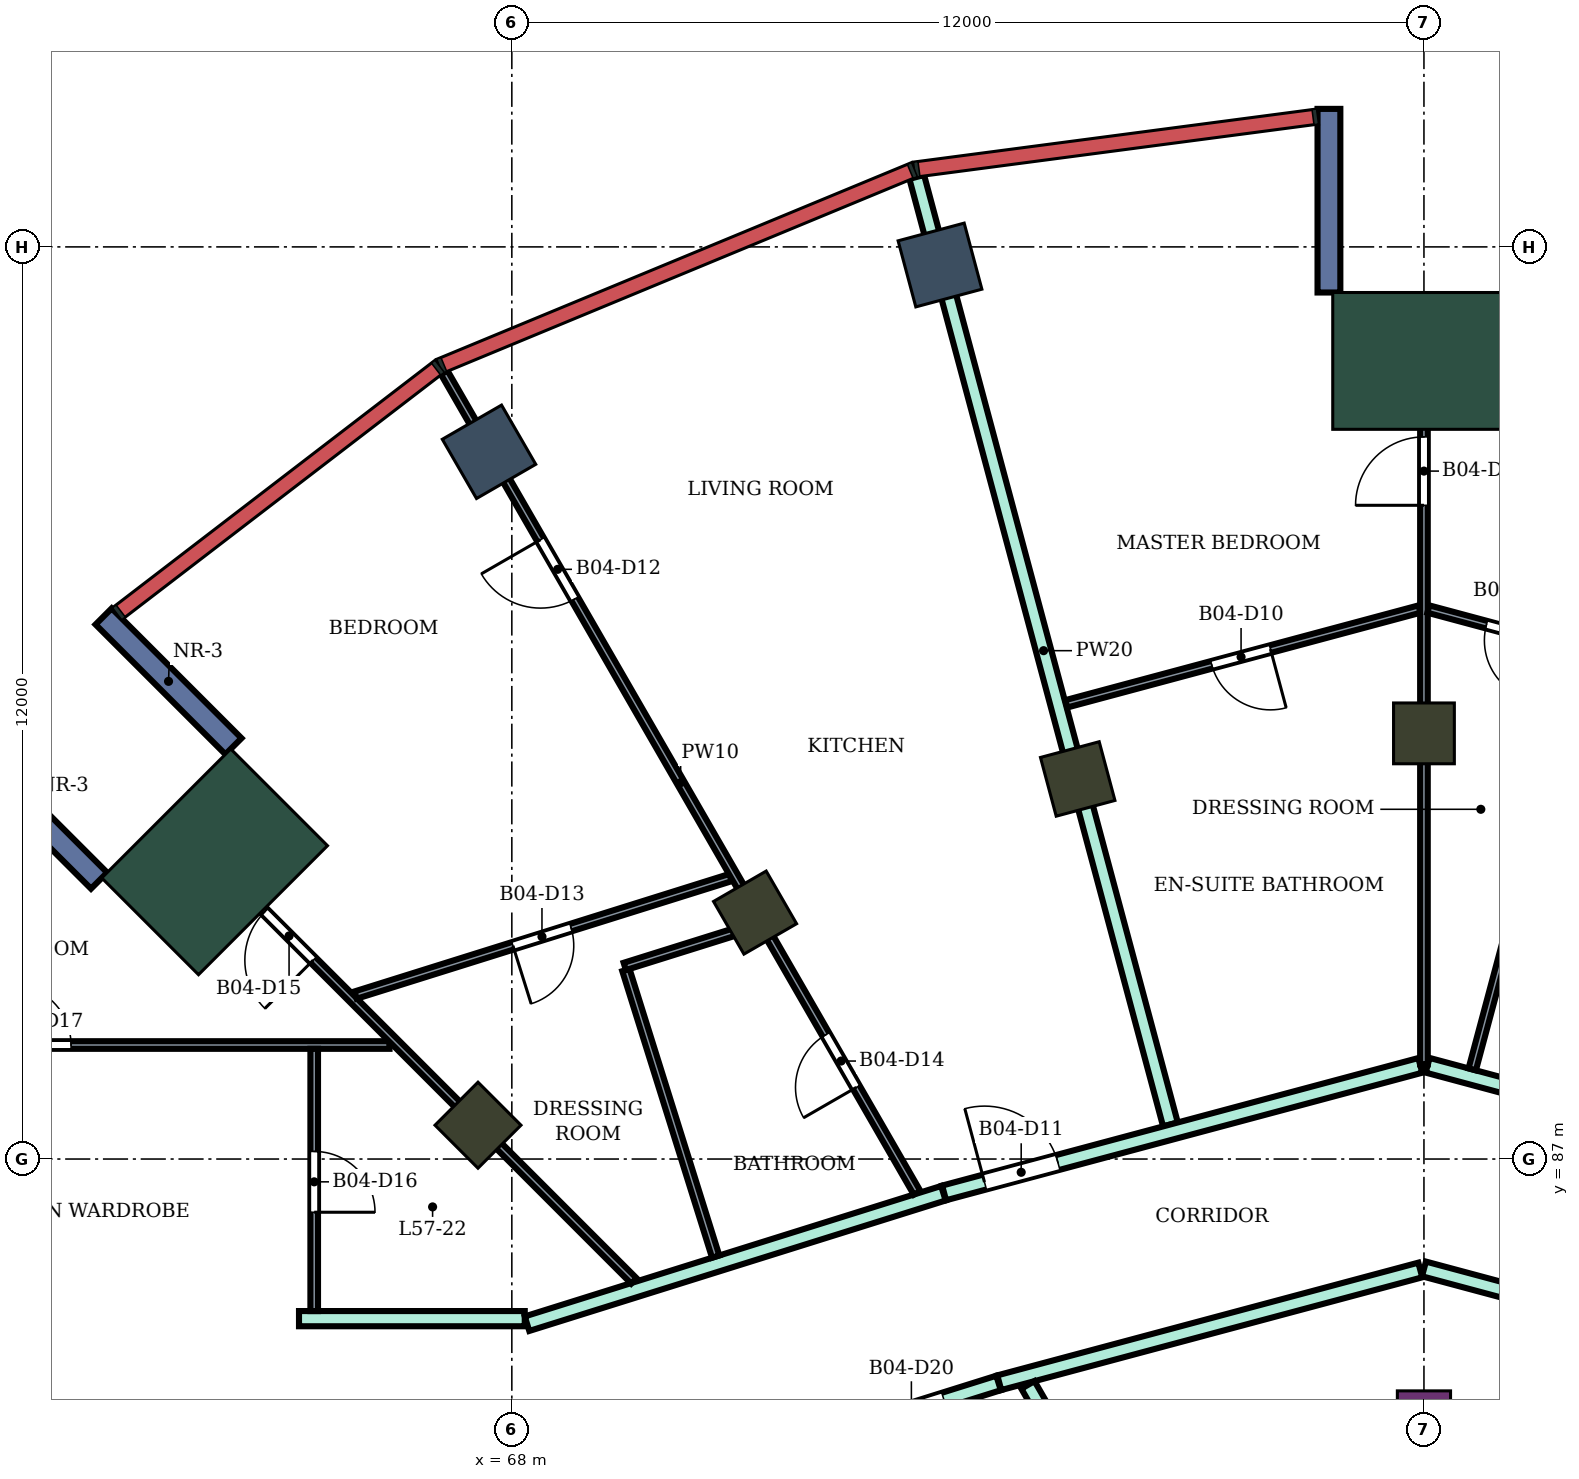
"""IFC4 building model, lengths in metres.
Left out: names, types, materials, properties, quantities, classifications, styles, units other than length and angle.
Written with IfcOpenShell. Run it as: python <this file> out.ifc"""

import sys

from ifc_helpers import new_model, si_unit, direction, frame, frame_2d, origin, origin_2d, place, context, subcontext, project, spatial, rectangle, extrude, element, fill, save


model = new_model("IFC4")
c1 = context("Model", 3, precision=1e-05, world=origin(), true_north=direction((0.0, 1.0)))
c2 = subcontext(c1, "Body", "Model", "MODEL_VIEW")
j1 = project(units=[si_unit("LENGTHUNIT", "METRE"), si_unit("PLANEANGLEUNIT", "RADIAN")], contexts=[c1])
p1 = place(None, origin())
s1 = spatial("IfcSite", under=j1, at=p1, CompositionType="ELEMENT")
p2 = place(p1, origin())
s2 = spatial("IfcBuilding", under=s1, at=p2, CompositionType="ELEMENT")
p3 = place(p2, frame((0.0, 0.0, 249.9)))
s3 = spatial("IfcBuildingStorey", under=s2, at=p3, CompositionType="ELEMENT", Elevation=249.9)
for number, where, z_axis, x_axis in (
    (1, (73.633, 98.762, 0.0), (0.0, 0.0, 1.0), (-0.259, 0.966, 0.0)),
    (2, (67.7, 96.304, 0.0), (0.0, 0.0, 1.0), (-0.5, 0.866, 0.0)),
):
    element("IfcColumn", number, at=place(p3, frame(where, z_axis=z_axis, x_axis=x_axis)), inside=s3, PredefinedType="COLUMN", context=c2, shape_type="SweptSolid", body=[
        extrude(rectangle(XDim=0.9, YDim=0.9, at=origin_2d()), origin(), (0.0, 0.0, 1.0), 4.2),
    ])
for number, where, z_axis, x_axis in (
    (3, (80.0, 92.6, 0.0), (0.0, 0.0, 1.0), (0.0, 1.0, 0.0)),
    (4, (75.445, 92.0, 0.0), (0.0, 0.0, 1.0), (-0.259, 0.966, 0.0)),
    (5, (71.2, 90.242, 0.0), (0.0, 0.0, 1.0), (-0.5, 0.866, 0.0)),
    (6, (67.555, 87.445, 0.0), (0.0, 0.0, 1.0), (-0.707, 0.707, 0.0)),
):
    element("IfcColumn", number, at=place(p3, frame(where, z_axis=z_axis, x_axis=x_axis)), inside=s3, PredefinedType="COLUMN", context=c2, shape_type="SweptSolid", body=[
        extrude(rectangle(XDim=0.8, YDim=0.8, at=origin_2d()), origin(), (0.0, 0.0, 1.0), 4.2),
    ])
p4 = place(p3, frame((80.0, 83.6, 0.0), z_axis=(0.0, 0.0, 1.0), x_axis=(0.0, 1.0, 0.0)))
e7 = element("IfcColumn", 7, at=p4, inside=s3, PredefinedType="COLUMN", context=c2, shape_type="SweptSolid", body=[
    extrude(rectangle(XDim=0.7, YDim=0.7, at=origin_2d()), origin(), (0.0, 0.0, 1.0), 4.2),
])
for number, where, z_axis, x_axis in (
    (8, (80.0, 97.5, 0.0), (0.0, 0.0, 1.0), (0.0, 1.0, 0.0)),
    (9, (64.09, 90.91, 0.0), (0.0, 0.0, 1.0), (-0.707, 0.707, 0.0)),
):
    element("IfcColumn", number, at=place(p3, frame(where, z_axis=z_axis, x_axis=x_axis)), inside=s3, PredefinedType="COLUMN", context=c2, shape_type="SweptSolid", body=[
        extrude(rectangle(XDim=1.8, YDim=2.4, at=origin_2d()), origin(), (0.0, 0.0, 1.0), 4.2),
    ])
for number, where, z_axis, x_axis in (
    (10, (78.75, 98.4, 0.0), (0.0, 0.0, 1.0), (0.0, 1.0, 0.0)),
    (11, (64.338, 92.43, 0.0), (0.0, 0.0, 1.0), (-0.707, 0.707, 0.0)),
    (12, (62.57, 90.662, 0.0), (0.0, 0.0, 1.0), (-0.707, 0.707, 0.0)),
):
    element("IfcWall", number, at=place(p3, frame(where, z_axis=z_axis, x_axis=x_axis)), inside=s3, PredefinedType="NOTDEFINED", context=c2, shape_type="SweptSolid", body=[
        extrude(rectangle(XDim=2.416, YDim=0.3, at=frame_2d((1.208, 0.0))), origin(), (0.0, 0.0, 1.0), 4.2),
    ])
p5 = place(p3, frame((65.2, 84.9, 0.0), z_axis=(0.0, 0.0, 1.0), x_axis=(1.0, 0.0, 0.0)))
e13 = element("IfcWall", 13, at=p5, inside=s3, PredefinedType="PARTITIONING", context=c2, shape_type="SweptSolid", body=[
    extrude(rectangle(XDim=2.97, YDim=0.2, at=frame_2d((1.485, 0.0))), origin(), (0.0, 0.0, 1.0), 3.75),
])
p6 = place(p3, frame((68.2, 84.834, 0.0), z_axis=(0.0, 0.0, 1.0), x_axis=(0.954260265251, 0.298977166624, 0.0)))
e14 = element("IfcWall", 14, at=p6, inside=s3, PredefinedType="PARTITIONING", context=c2, shape_type="SweptSolid", body=[
    extrude(rectangle(XDim=5.741, YDim=0.2, at=frame_2d((2.87, 0.0))), origin(), (0.0, 0.0, 1.0), 3.75),
])
p7 = place(p3, frame((72.1, 83.332, 0.0), z_axis=(0.0, 0.0, 1.0), x_axis=(0.954233106619, 0.299063836383, 0.0)))
e15 = element("IfcWall", 15, at=p7, inside=s3, PredefinedType="PARTITIONING", context=c2, shape_type="SweptSolid", body=[
    extrude(rectangle(XDim=2.414, YDim=0.2, at=frame_2d((1.207, 0.0))), origin(), (0.0, 0.0, 1.0), 3.75),
])
p8 = place(p7, frame((0.762, 0.0, 0.0)))
e16 = element("IfcOpeningElement", 16, at=p8, cuts=e15, PredefinedType="OPENING", context=c2, shape_type="SweptSolid", body=[
    extrude(rectangle(XDim=0.9, YDim=2.1, at=frame_2d((0.45, 1.05))), frame((0.0, 0.11, 0.0), z_axis=(0.0, -1.0, 0.0), x_axis=(1.0, 0.0, 0.0)), (0.0, 0.0, 1.0), 0.22),
])
p9 = place(p3, frame((73.327, 99.92, 0.0), z_axis=(0.0, 0.0, 1.0), x_axis=(0.258652861824, -0.965970339643, 0.0)))
e17 = element("IfcWall", 17, at=p9, inside=s3, PredefinedType="PARTITIONING", context=c2, shape_type="SweptSolid", body=[
    extrude(rectangle(XDim=12.904, YDim=0.2, at=frame_2d((6.452, 0.0))), origin(), (0.0, 0.0, 1.0), 3.75),
])
p10 = place(p3, frame((73.687, 86.554, 0.0), z_axis=(0.0, 0.0, 1.0), x_axis=(0.965961994098, 0.258684027257, 0.0)))
e18 = element("IfcWall", 18, at=p10, inside=s3, PredefinedType="PARTITIONING", context=c2, shape_type="SweptSolid", body=[
    extrude(rectangle(XDim=6.486, YDim=0.2, at=frame_2d((3.243, 0.0))), origin(), (0.0, 0.0, 1.0), 3.75),
])
p11 = place(p10, frame((0.55, 0.0, 0.0)))
e19 = element("IfcOpeningElement", 19, at=p11, cuts=e18, PredefinedType="OPENING", context=c2, shape_type="SweptSolid", body=[
    extrude(rectangle(XDim=1.0, YDim=2.1, at=frame_2d((0.5, 1.05))), frame((0.0, 0.11, 0.0), z_axis=(0.0, -1.0, 0.0), x_axis=(1.0, 0.0, 0.0)), (0.0, 0.0, 1.0), 0.22),
])
p12 = place(p3, frame((74.413, 84.057, 0.0), z_axis=(0.0, 0.0, 1.0), x_axis=(0.965970849692, 0.258650956976, 0.0)))
e20 = element("IfcWall", 20, at=p12, inside=s3, PredefinedType="PARTITIONING", context=c2, shape_type="SweptSolid", body=[
    extrude(rectangle(XDim=5.734, YDim=0.2, at=frame_2d((2.867, 0.0))), origin(), (0.0, 0.0, 1.0), 3.75),
])
p13 = place(p3, frame((74.79, 84.028, 0.0), z_axis=(0.0, 0.0, 1.0), x_axis=(0.499859501914, -0.866106505198, 0.0)))
e21 = element("IfcWall", 21, at=p13, inside=s3, PredefinedType="PARTITIONING", context=c2, shape_type="SweptSolid", body=[
    extrude(rectangle(XDim=2.724, YDim=0.2, at=frame_2d((1.362, 0.0))), origin(), (0.0, 0.0, 1.0), 3.75),
])
p14 = place(p3, frame((80.0, 85.554, 0.0), z_axis=(0.0, 0.0, 1.0), x_axis=(0.965894438951, -0.258936155845, 0.0)))
e22 = element("IfcWall", 22, at=p14, inside=s3, PredefinedType="PARTITIONING", context=c2, shape_type="SweptSolid", body=[
    extrude(rectangle(XDim=5.774, YDim=0.2, at=frame_2d((2.887, 0.0))), origin(), (0.0, 0.0, 1.0), 3.75),
])
p15 = place(p14, frame((1.841, 0.0, 0.0)))
e23 = element("IfcOpeningElement", 23, at=p15, cuts=e22, PredefinedType="OPENING", context=c2, shape_type="SweptSolid", body=[
    extrude(rectangle(XDim=1.8, YDim=2.1, at=frame_2d((0.9, 1.05))), frame((0.0, 0.11, 0.0), z_axis=(0.0, -1.0, 0.0), x_axis=(1.0, 0.0, 0.0)), (0.0, 0.0, 1.0), 0.22),
])
p16 = place(p3, frame((80.048, 88.233, 0.0), z_axis=(0.0, 0.0, 1.0), x_axis=(0.965787353661, -0.259335280109, 0.0)))
e24 = element("IfcWall", 24, at=p16, inside=s3, PredefinedType="PARTITIONING", context=c2, shape_type="SweptSolid", body=[
    extrude(rectangle(XDim=6.476, YDim=0.2, at=frame_2d((3.238, 0.0))), origin(), (0.0, 0.0, 1.0), 3.75),
])
p17 = place(p16, frame((4.936, 0.0, 0.0)))
e25 = element("IfcOpeningElement", 25, at=p17, cuts=e24, PredefinedType="OPENING", context=c2, shape_type="SweptSolid", body=[
    extrude(rectangle(XDim=1.0, YDim=2.1, at=frame_2d((0.5, 1.05))), frame((0.0, 0.11, 0.0), z_axis=(0.0, -1.0, 0.0), x_axis=(1.0, 0.0, 0.0)), (0.0, 0.0, 1.0), 0.22),
])
p18 = place(p3, frame((58.072, 88.5, 0.0), z_axis=(0.0, 0.0, 1.0), x_axis=(1.0, 0.0, 0.0)))
e26 = element("IfcWall", 26, at=p18, inside=s3, PredefinedType="PARTITIONING", context=c2, shape_type="SweptSolid", body=[
    extrude(rectangle(XDim=8.319, YDim=0.1, at=frame_2d((4.159, 0.0))), origin(), (0.0, 0.0, 1.0), 3.75),
])
p19 = place(p18, frame((3.329, 0.0, 0.0)))
e27 = element("IfcOpeningElement", 27, at=p19, cuts=e26, PredefinedType="OPENING", context=c2, shape_type="SweptSolid", body=[
    extrude(rectangle(XDim=0.8, YDim=2.1, at=frame_2d((0.4, 1.05))), frame((0.0, 0.06, 0.0), z_axis=(0.0, -1.0, 0.0), x_axis=(1.0, 0.0, 0.0)), (0.0, 0.0, 1.0), 0.12),
])
p20 = place(p3, frame((63.597, 91.407, 0.0), z_axis=(0.0, 0.0, 1.0), x_axis=(0.70700623685, -0.707207311228, 0.0)))
e28 = element("IfcWall", 28, at=p20, inside=s3, PredefinedType="PARTITIONING", context=c2, shape_type="SweptSolid", body=[
    extrude(rectangle(XDim=8.499, YDim=0.1, at=frame_2d((4.25, 0.0))), origin(), (0.0, 0.0, 1.0), 3.75),
])
p21 = place(p20, frame((1.632, 0.0, 0.0)))
e29 = element("IfcOpeningElement", 29, at=p21, cuts=e28, PredefinedType="OPENING", context=c2, shape_type="SweptSolid", body=[
    extrude(rectangle(XDim=0.9, YDim=2.1, at=frame_2d((0.45, 1.05))), frame((0.0, 0.06, 0.0), z_axis=(0.0, -1.0, 0.0), x_axis=(1.0, 0.0, 0.0)), (0.0, 0.0, 1.0), 0.12),
])
p22 = place(p3, frame((65.4, 85.0, 0.0), z_axis=(0.0, 0.0, 1.0), x_axis=(0.0, 1.0, 0.0)))
e30 = element("IfcWall", 30, at=p22, inside=s3, PredefinedType="PARTITIONING", context=c2, shape_type="SweptSolid", body=[
    extrude(rectangle(XDim=3.45, YDim=0.1, at=frame_2d((1.725, 0.0))), origin(), (0.0, 0.0, 1.0), 3.75),
])
p23 = place(p22, frame((1.3, 0.0, 0.0)))
e31 = element("IfcOpeningElement", 31, at=p23, cuts=e30, PredefinedType="OPENING", context=c2, shape_type="SweptSolid", body=[
    extrude(rectangle(XDim=0.8, YDim=2.1, at=frame_2d((0.4, 1.05))), frame((0.0, 0.06, 0.0), z_axis=(0.0, -1.0, 0.0), x_axis=(1.0, 0.0, 0.0)), (0.0, 0.0, 1.0), 0.12),
])
p24 = place(p3, frame((65.944, 89.157, 0.0), z_axis=(0.0, 0.0, 1.0), x_axis=(0.954238484697, 0.299046675828, 0.0)))
e32 = element("IfcWall", 32, at=p24, inside=s3, PredefinedType="PARTITIONING", context=c2, shape_type="SweptSolid", body=[
    extrude(rectangle(XDim=5.169, YDim=0.1, at=frame_2d((2.585, 0.0))), origin(), (0.0, 0.0, 1.0), 3.75),
])
p25 = place(p24, frame((2.17, 0.0, 0.0)))
e33 = element("IfcOpeningElement", 33, at=p25, cuts=e32, PredefinedType="OPENING", context=c2, shape_type="SweptSolid", body=[
    extrude(rectangle(XDim=0.8, YDim=2.1, at=frame_2d((0.4, 1.05))), frame((0.0, 0.06, 0.0), z_axis=(0.0, -1.0, 0.0), x_axis=(1.0, 0.0, 0.0)), (0.0, 0.0, 1.0), 0.12),
])
p26 = place(p3, frame((67.111, 97.347, 0.0), z_axis=(0.0, 0.0, 1.0), x_axis=(0.499428303955, -0.866355221147, 0.0)))
e34 = element("IfcWall", 34, at=p26, inside=s3, PredefinedType="PARTITIONING", context=c2, shape_type="SweptSolid", body=[
    extrude(rectangle(XDim=12.456, YDim=0.1, at=frame_2d((6.228, 0.0))), origin(), (0.0, 0.0, 1.0), 3.75),
])
p27 = place(p26, frame((2.538, 0.0, 0.0)))
e35 = element("IfcOpeningElement", 35, at=p27, cuts=e34, PredefinedType="OPENING", context=c2, shape_type="SweptSolid", body=[
    extrude(rectangle(XDim=0.9, YDim=2.1, at=frame_2d((0.45, 1.05))), frame((0.0, 0.06, 0.0), z_axis=(0.0, -1.0, 0.0), x_axis=(1.0, 0.0, 0.0)), (0.0, 0.0, 1.0), 0.12),
])
p28 = place(p26, frame((10.055, 0.0, 0.0)))
e36 = element("IfcOpeningElement", 36, at=p28, cuts=e34, PredefinedType="OPENING", context=c2, shape_type="SweptSolid", body=[
    extrude(rectangle(XDim=0.8, YDim=2.1, at=frame_2d((0.4, 1.05))), frame((0.0, 0.06, 0.0), z_axis=(0.0, -1.0, 0.0), x_axis=(1.0, 0.0, 0.0)), (0.0, 0.0, 1.0), 0.12),
])
p29 = place(p3, frame((69.501, 89.486, 0.0), z_axis=(0.0, 0.0, 1.0), x_axis=(0.298971609069, -0.954262006459, 0.0)))
e37 = element("IfcWall", 37, at=p29, inside=s3, PredefinedType="PARTITIONING", context=c2, shape_type="SweptSolid", body=[
    extrude(rectangle(XDim=3.951, YDim=0.1, at=frame_2d((1.975, 0.0))), origin(), (0.0, 0.0, 1.0), 3.75),
])
p30 = place(p3, frame((69.486, 89.534, 0.0), z_axis=(0.0, 0.0, 1.0), x_axis=(0.954254575134, 0.298995327449, 0.0)))
e38 = element("IfcWall", 38, at=p30, inside=s3, PredefinedType="PARTITIONING", context=c2, shape_type="SweptSolid", body=[
    extrude(rectangle(XDim=1.833, YDim=0.1, at=frame_2d((0.917, 0.0))), origin(), (0.0, 0.0, 1.0), 3.75),
])
p31 = place(p3, frame((75.294, 92.989, 0.0), z_axis=(0.0, 0.0, 1.0), x_axis=(0.965836333205, 0.259152807165, 0.0)))
e39 = element("IfcWall", 39, at=p31, inside=s3, PredefinedType="PARTITIONING", context=c2, shape_type="SweptSolid", body=[
    extrude(rectangle(XDim=4.812, YDim=0.1, at=frame_2d((2.406, 0.0))), origin(), (0.0, 0.0, 1.0), 3.75),
])
p32 = place(p31, frame((1.981, 0.0, 0.0)))
e40 = element("IfcOpeningElement", 40, at=p32, cuts=e39, PredefinedType="OPENING", context=c2, shape_type="SweptSolid", body=[
    extrude(rectangle(XDim=0.8, YDim=2.1, at=frame_2d((0.4, 1.05))), frame((0.0, 0.06, 0.0), z_axis=(0.0, -1.0, 0.0), x_axis=(1.0, 0.0, 0.0)), (0.0, 0.0, 1.0), 0.12),
])
p33 = place(p3, frame((80.0, 88.246, 0.0), z_axis=(0.0, 0.0, 1.0), x_axis=(0.0, 1.0, 0.0)))
e41 = element("IfcWall", 41, at=p33, inside=s3, PredefinedType="PARTITIONING", context=c2, shape_type="SweptSolid", body=[
    extrude(rectangle(XDim=9.954, YDim=0.1, at=frame_2d((4.977, 0.0))), origin(), (0.0, 0.0, 1.0), 3.75),
])
p34 = place(p33, frame((7.354, 0.0, 0.0)))
e42 = element("IfcOpeningElement", 42, at=p34, cuts=e41, PredefinedType="OPENING", context=c2, shape_type="SweptSolid", body=[
    extrude(rectangle(XDim=0.9, YDim=2.1, at=frame_2d((0.45, 1.05))), frame((0.0, 0.06, 0.0), z_axis=(0.0, -1.0, 0.0), x_axis=(1.0, 0.0, 0.0)), (0.0, 0.0, 1.0), 0.12),
])
p35 = place(p3, frame((80.058, 94.235, 0.0), z_axis=(0.0, 0.0, 1.0), x_axis=(0.965831212389, -0.259171891173, 0.0)))
e43 = element("IfcWall", 43, at=p35, inside=s3, PredefinedType="PARTITIONING", context=c2, shape_type="SweptSolid", body=[
    extrude(rectangle(XDim=4.872, YDim=0.1, at=frame_2d((2.436, 0.0))), origin(), (0.0, 0.0, 1.0), 3.75),
])
p36 = place(p35, frame((0.792, 0.0, 0.0)))
e44 = element("IfcOpeningElement", 44, at=p36, cuts=e43, PredefinedType="OPENING", context=c2, shape_type="SweptSolid", body=[
    extrude(rectangle(XDim=0.8, YDim=2.1, at=frame_2d((0.4, 1.05))), frame((0.0, 0.06, 0.0), z_axis=(0.0, -1.0, 0.0), x_axis=(1.0, 0.0, 0.0)), (0.0, 0.0, 1.0), 0.12),
])
p37 = place(p3, frame((80.635, 88.179, 0.0), z_axis=(0.0, 0.0, 1.0), x_axis=(0.258942728312, 0.965892676986, 0.0)))
e45 = element("IfcWall", 45, at=p37, inside=s3, PredefinedType="PARTITIONING", context=c2, shape_type="SweptSolid", body=[
    extrude(rectangle(XDim=5.649, YDim=0.1, at=frame_2d((2.825, 0.0))), origin(), (0.0, 0.0, 1.0), 3.75),
])
p38 = place(p36, frame((0.8, 0.0, 0.0), z_axis=(0.0, 0.0, 1.0), x_axis=(-1.0, 0.0, 0.0)))
e46 = element("IfcDoor", 46, at=p38, inside=s3, OperationType="SINGLE_SWING_LEFT", PredefinedType="DOOR", context=c2, shape_type="SweptSolid", body=[
    extrude(rectangle(XDim=0.8, YDim=2.1, at=frame_2d((0.4, 1.05))), frame((0.0, 0.025, 0.0), z_axis=(0.0, -1.0, 0.0), x_axis=(1.0, 0.0, 0.0)), (0.0, 0.0, 1.0), 0.05),
])
fill(e44, e46)
p39 = place(p34, origin())
e47 = element("IfcDoor", 47, at=p39, inside=s3, OperationType="SINGLE_SWING_LEFT", PredefinedType="DOOR", context=c2, shape_type="SweptSolid", body=[
    extrude(rectangle(XDim=0.9, YDim=2.1, at=frame_2d((0.45, 1.05))), frame((0.0, 0.025, 0.0), z_axis=(0.0, -1.0, 0.0), x_axis=(1.0, 0.0, 0.0)), (0.0, 0.0, 1.0), 0.05),
])
fill(e42, e47)
p40 = place(p32, frame((0.8, 0.0, 0.0), z_axis=(0.0, 0.0, 1.0), x_axis=(-1.0, 0.0, 0.0)))
e48 = element("IfcDoor", 48, at=p40, inside=s3, OperationType="SINGLE_SWING_LEFT", PredefinedType="DOOR", context=c2, shape_type="SweptSolid", body=[
    extrude(rectangle(XDim=0.8, YDim=2.1, at=frame_2d((0.4, 1.05))), frame((0.0, 0.025, 0.0), z_axis=(0.0, -1.0, 0.0), x_axis=(1.0, 0.0, 0.0)), (0.0, 0.0, 1.0), 0.05),
])
fill(e40, e48)
p41 = place(p11, origin())
e49 = element("IfcDoor", 49, at=p41, inside=s3, OperationType="SINGLE_SWING_LEFT", PredefinedType="DOOR", context=c2, shape_type="SweptSolid", body=[
    extrude(rectangle(XDim=1.0, YDim=2.1, at=frame_2d((0.5, 1.05))), frame((0.0, 0.025, 0.0), z_axis=(0.0, -1.0, 0.0), x_axis=(1.0, 0.0, 0.0)), (0.0, 0.0, 1.0), 0.05),
])
fill(e19, e49)
p42 = place(p27, frame((0.9, 0.0, 0.0), z_axis=(0.0, 0.0, 1.0), x_axis=(-1.0, 0.0, 0.0)))
e50 = element("IfcDoor", 50, at=p42, inside=s3, OperationType="SINGLE_SWING_RIGHT", PredefinedType="DOOR", context=c2, shape_type="SweptSolid", body=[
    extrude(rectangle(XDim=0.9, YDim=2.1, at=frame_2d((0.45, 1.05))), frame((0.0, 0.025, 0.0), z_axis=(0.0, -1.0, 0.0), x_axis=(1.0, 0.0, 0.0)), (0.0, 0.0, 1.0), 0.05),
])
fill(e35, e50)
p43 = place(p25, frame((0.8, 0.0, 0.0), z_axis=(0.0, 0.0, 1.0), x_axis=(-1.0, 0.0, 0.0)))
e51 = element("IfcDoor", 51, at=p43, inside=s3, OperationType="SINGLE_SWING_RIGHT", PredefinedType="DOOR", context=c2, shape_type="SweptSolid", body=[
    extrude(rectangle(XDim=0.8, YDim=2.1, at=frame_2d((0.4, 1.05))), frame((0.0, 0.025, 0.0), z_axis=(0.0, -1.0, 0.0), x_axis=(1.0, 0.0, 0.0)), (0.0, 0.0, 1.0), 0.05),
])
fill(e33, e51)
p44 = place(p28, frame((0.8, 0.0, 0.0), z_axis=(0.0, 0.0, 1.0), x_axis=(-1.0, 0.0, 0.0)))
e52 = element("IfcDoor", 52, at=p44, inside=s3, OperationType="SINGLE_SWING_LEFT", PredefinedType="DOOR", context=c2, shape_type="SweptSolid", body=[
    extrude(rectangle(XDim=0.8, YDim=2.1, at=frame_2d((0.4, 1.05))), frame((0.0, 0.025, 0.0), z_axis=(0.0, -1.0, 0.0), x_axis=(1.0, 0.0, 0.0)), (0.0, 0.0, 1.0), 0.05),
])
fill(e36, e52)
p45 = place(p21, frame((0.9, 0.0, 0.0), z_axis=(0.0, 0.0, 1.0), x_axis=(-1.0, 0.0, 0.0)))
e53 = element("IfcDoor", 53, at=p45, inside=s3, OperationType="SINGLE_SWING_LEFT", PredefinedType="DOOR", context=c2, shape_type="SweptSolid", body=[
    extrude(rectangle(XDim=0.9, YDim=2.1, at=frame_2d((0.45, 1.05))), frame((0.0, 0.025, 0.0), z_axis=(0.0, -1.0, 0.0), x_axis=(1.0, 0.0, 0.0)), (0.0, 0.0, 1.0), 0.05),
])
fill(e29, e53)
p46 = place(p23, frame((0.8, 0.0, 0.0), z_axis=(0.0, 0.0, 1.0), x_axis=(-1.0, 0.0, 0.0)))
e54 = element("IfcDoor", 54, at=p46, inside=s3, OperationType="SINGLE_SWING_RIGHT", PredefinedType="DOOR", context=c2, shape_type="SweptSolid", body=[
    extrude(rectangle(XDim=0.8, YDim=2.1, at=frame_2d((0.4, 1.05))), frame((0.0, 0.025, 0.0), z_axis=(0.0, -1.0, 0.0), x_axis=(1.0, 0.0, 0.0)), (0.0, 0.0, 1.0), 0.05),
])
fill(e31, e54)
p47 = place(p19, origin())
e55 = element("IfcDoor", 55, at=p47, inside=s3, OperationType="SINGLE_SWING_LEFT", PredefinedType="DOOR", context=c2, shape_type="SweptSolid", body=[
    extrude(rectangle(XDim=0.8, YDim=2.1, at=frame_2d((0.4, 1.05))), frame((0.0, 0.025, 0.0), z_axis=(0.0, -1.0, 0.0), x_axis=(1.0, 0.0, 0.0)), (0.0, 0.0, 1.0), 0.05),
])
fill(e27, e55)
p48 = place(p8, frame((0.9, 0.0, 0.0), z_axis=(0.0, 0.0, 1.0), x_axis=(-1.0, 0.0, 0.0)))
e56 = element("IfcDoor", 56, at=p48, inside=s3, OperationType="SINGLE_SWING_RIGHT", PredefinedType="DOOR", context=c2, shape_type="SweptSolid", body=[
    extrude(rectangle(XDim=0.9, YDim=2.1, at=frame_2d((0.45, 1.05))), frame((0.0, 0.025, 0.0), z_axis=(0.0, -1.0, 0.0), x_axis=(1.0, 0.0, 0.0)), (0.0, 0.0, 1.0), 0.05),
])
fill(e16, e56)
save(model, sys.argv[1])
